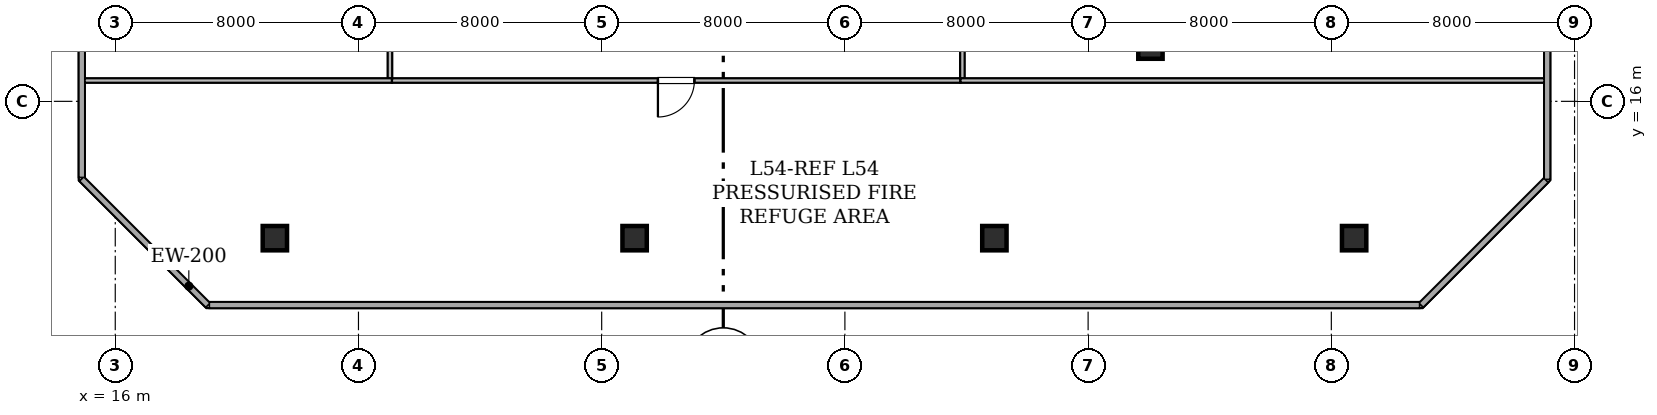
"""IFC4 building model, lengths in metres.
Left out: names, types, materials, properties, quantities, classifications, styles, units other than length and angle.
Written with IfcOpenShell. Run it as: python <this file> out.ifc"""

import sys

from ifc_helpers import new_model, si_unit, direction, frame, frame_2d, origin, origin_2d, place, context, subcontext, project, spatial, rectangle, hollow_rectangle, extrude, element, fill, save


model = new_model("IFC4")
c1 = context("Model", 3, precision=1e-05, world=origin(), true_north=direction((0.0, 1.0)))
c2 = subcontext(c1, "Body", "Model", "MODEL_VIEW")
j1 = project(units=[si_unit("LENGTHUNIT", "METRE"), si_unit("PLANEANGLEUNIT", "RADIAN")], contexts=[c1])
p1 = place(None, origin())
s1 = spatial("IfcSite", under=j1, at=p1, CompositionType="ELEMENT")
p2 = place(p1, origin())
s2 = spatial("IfcBuilding", under=s1, at=p2, CompositionType="ELEMENT")
p3 = place(p2, frame((0.0, 0.0, 211.8)))
s3 = spatial("IfcBuildingStorey", under=s2, at=p3, CompositionType="ELEMENT", Elevation=211.8)
for number, where, z_axis, x_axis in (
    (1, (21.25, 11.5, 0.0), (0.0, 0.0, 1.0), (1.0, 0.0, 0.0)),
    (2, (33.083, 11.5, 0.0), (0.0, 0.0, 1.0), (1.0, 0.0, 0.0)),
    (3, (44.917, 11.5, 0.0), (0.0, 0.0, 1.0), (1.0, 0.0, 0.0)),
    (4, (56.75, 11.5, 0.0), (0.0, 0.0, 1.0), (1.0, 0.0, 0.0)),
    (5, (50.05, 17.8, 0.0), (0.0, 0.0, 1.0), (1.0, 0.0, 0.0)),
):
    element("IfcColumn", number, at=place(p3, frame(where, z_axis=z_axis, x_axis=x_axis)), inside=s3, PredefinedType="COLUMN", context=c2, shape_type="SweptSolid", body=[
        extrude(hollow_rectangle(XDim=0.8, YDim=0.8, WallThickness=0.04, at=origin_2d()), origin(), (0.0, 0.0, 1.0), 5.375),
    ])
p4 = place(p3, frame((19.041, 9.3, 0.0), z_axis=(0.0, 0.0, 1.0), x_axis=(-0.707127625344, 0.707085936414, 0.0)))
e6 = element("IfcWall", 6, at=p4, inside=s3, PredefinedType="STANDARD", context=c2, shape_type="SweptSolid", body=[
    extrude(rectangle(XDim=5.856, YDim=0.2, at=frame_2d((2.928, 0.0))), origin(), (0.0, 0.0, 1.0), 1.15),
])
p5 = place(p3, frame((14.9, 13.504, 0.0), z_axis=(0.0, 0.0, 1.0), x_axis=(0.0, 1.0, 0.0)))
e7 = element("IfcWall", 7, at=p5, inside=s3, PredefinedType="STANDARD", context=c2, shape_type="SweptSolid", body=[
    extrude(rectangle(XDim=11.263, YDim=0.2, at=frame_2d((5.632, 0.0))), origin(), (0.0, 0.0, 1.0), 1.15),
])
p6 = place(p3, frame((63.1, 24.717, 0.0), z_axis=(0.0, 0.0, 1.0), x_axis=(0.0, -1.0, 0.0)))
e8 = element("IfcWall", 8, at=p6, inside=s3, PredefinedType="STANDARD", context=c2, shape_type="SweptSolid", body=[
    extrude(rectangle(XDim=11.276, YDim=0.2, at=frame_2d((5.638, 0.0))), origin(), (0.0, 0.0, 1.0), 1.15),
])
p7 = place(p3, frame((63.057, 13.398, 0.0), z_axis=(0.0, 0.0, 1.0), x_axis=(-0.707106781187, -0.707106781187, 0.0)))
e9 = element("IfcWall", 9, at=p7, inside=s3, PredefinedType="STANDARD", context=c2, shape_type="SweptSolid", body=[
    extrude(rectangle(XDim=5.795, YDim=0.2, at=frame_2d((2.898, 0.0))), origin(), (0.0, 0.0, 1.0), 1.15),
])
p8 = place(p3, frame((58.896, 9.3, 0.0), z_axis=(0.0, 0.0, 1.0), x_axis=(-1.0, 0.0, 0.0)))
e10 = element("IfcWall", 10, at=p8, inside=s3, PredefinedType="STANDARD", context=c2, shape_type="SweptSolid", body=[
    extrude(rectangle(XDim=39.793, YDim=0.2, at=frame_2d((19.896, 0.0))), origin(), (0.0, 0.0, 1.0), 1.15),
])
p9 = place(p3, frame((43.8, 16.685, 0.0), z_axis=(0.0, 0.0, 1.0), x_axis=(-1.0, 0.0, 0.0)))
e11 = element("IfcWall", 11, at=p9, inside=s3, PredefinedType="STANDARD", context=c2, shape_type="SweptSolid", body=[
    extrude(rectangle(XDim=18.7, YDim=0.15, at=frame_2d((9.35, 0.0))), origin(), (0.0, 0.0, 1.0), 3.42),
])
p10 = place(p9, frame((8.75, 0.0, 0.0)))
e12 = element("IfcOpeningElement", 12, at=p10, cuts=e11, PredefinedType="OPENING", context=c2, shape_type="SweptSolid", body=[
    extrude(rectangle(XDim=1.2, YDim=2.15, at=frame_2d((0.6, 1.075))), frame((0.0, 0.085, 0.0), z_axis=(0.0, -1.0, 0.0), x_axis=(1.0, 0.0, 0.0)), (0.0, 0.0, 1.0), 0.17),
])
p11 = place(p3, frame((25.035, 16.75, 0.0), z_axis=(0.0, 0.0, 1.0), x_axis=(0.0, 1.0, 0.0)))
e13 = element("IfcWall", 13, at=p11, inside=s3, PredefinedType="STANDARD", context=c2, shape_type="SweptSolid", body=[
    extrude(rectangle(XDim=12.564, YDim=0.15, at=frame_2d((6.282, 0.0))), origin(), (0.0, 0.0, 1.0), 3.42),
])
p12 = place(p11, frame((5.661, 0.0, 0.0)))
e14 = element("IfcOpeningElement", 14, at=p12, cuts=e13, PredefinedType="OPENING", context=c2, shape_type="SweptSolid", body=[
    extrude(rectangle(XDim=1.2, YDim=2.15, at=frame_2d((0.6, 1.075))), frame((0.0, 0.085, 0.0), z_axis=(0.0, -1.0, 0.0), x_axis=(1.0, 0.0, 0.0)), (0.0, 0.0, 1.0), 0.17),
])
p13 = place(p3, frame((43.865, 29.314, 0.0), z_axis=(0.0, 0.0, 1.0), x_axis=(0.0, -1.0, 0.0)))
e15 = element("IfcWall", 15, at=p13, inside=s3, PredefinedType="STANDARD", context=c2, shape_type="SweptSolid", body=[
    extrude(rectangle(XDim=12.564, YDim=0.15, at=frame_2d((6.282, 0.0))), origin(), (0.0, 0.0, 1.0), 3.42),
])
p14 = place(p13, frame((5.703, 0.0, 0.0)))
e16 = element("IfcOpeningElement", 16, at=p14, cuts=e15, PredefinedType="OPENING", context=c2, shape_type="SweptSolid", body=[
    extrude(rectangle(XDim=1.2, YDim=2.15, at=frame_2d((0.6, 1.075))), frame((0.0, 0.085, 0.0), z_axis=(0.0, -1.0, 0.0), x_axis=(1.0, 0.0, 0.0)), (0.0, 0.0, 1.0), 0.17),
])
p15 = place(p3, frame((14.992, 16.685, 0.0), z_axis=(0.0, 0.0, 1.0), x_axis=(1.0, 0.0, 0.0)))
e17 = element("IfcWall", 17, at=p15, inside=s3, PredefinedType="STANDARD", context=c2, shape_type="SweptSolid", body=[
    extrude(rectangle(XDim=10.108, YDim=0.15, at=frame_2d((5.054, 0.0))), origin(), (0.0, 0.0, 1.0), 3.42),
])
p16 = place(p3, frame((43.8, 16.685, 0.0), z_axis=(0.0, 0.0, 1.0), x_axis=(1.0, 0.0, 0.0)))
e18 = element("IfcWall", 18, at=p16, inside=s3, PredefinedType="STANDARD", context=c2, shape_type="SweptSolid", body=[
    extrude(rectangle(XDim=19.208, YDim=0.15, at=frame_2d((9.604, 0.0))), origin(), (0.0, 0.0, 1.0), 3.42),
])
p17 = place(p10, origin())
e19 = element("IfcDoor", 19, at=p17, inside=s3, OperationType="SINGLE_SWING_RIGHT", PredefinedType="DOOR", context=c2, shape_type="SweptSolid", body=[
    extrude(rectangle(XDim=1.2, YDim=2.15, at=frame_2d((0.6, 1.075))), frame((0.0, 0.025, 0.0), z_axis=(0.0, -1.0, 0.0), x_axis=(1.0, 0.0, 0.0)), (0.0, 0.0, 1.0), 0.05),
])
fill(e12, e19)
save(model, sys.argv[1])
